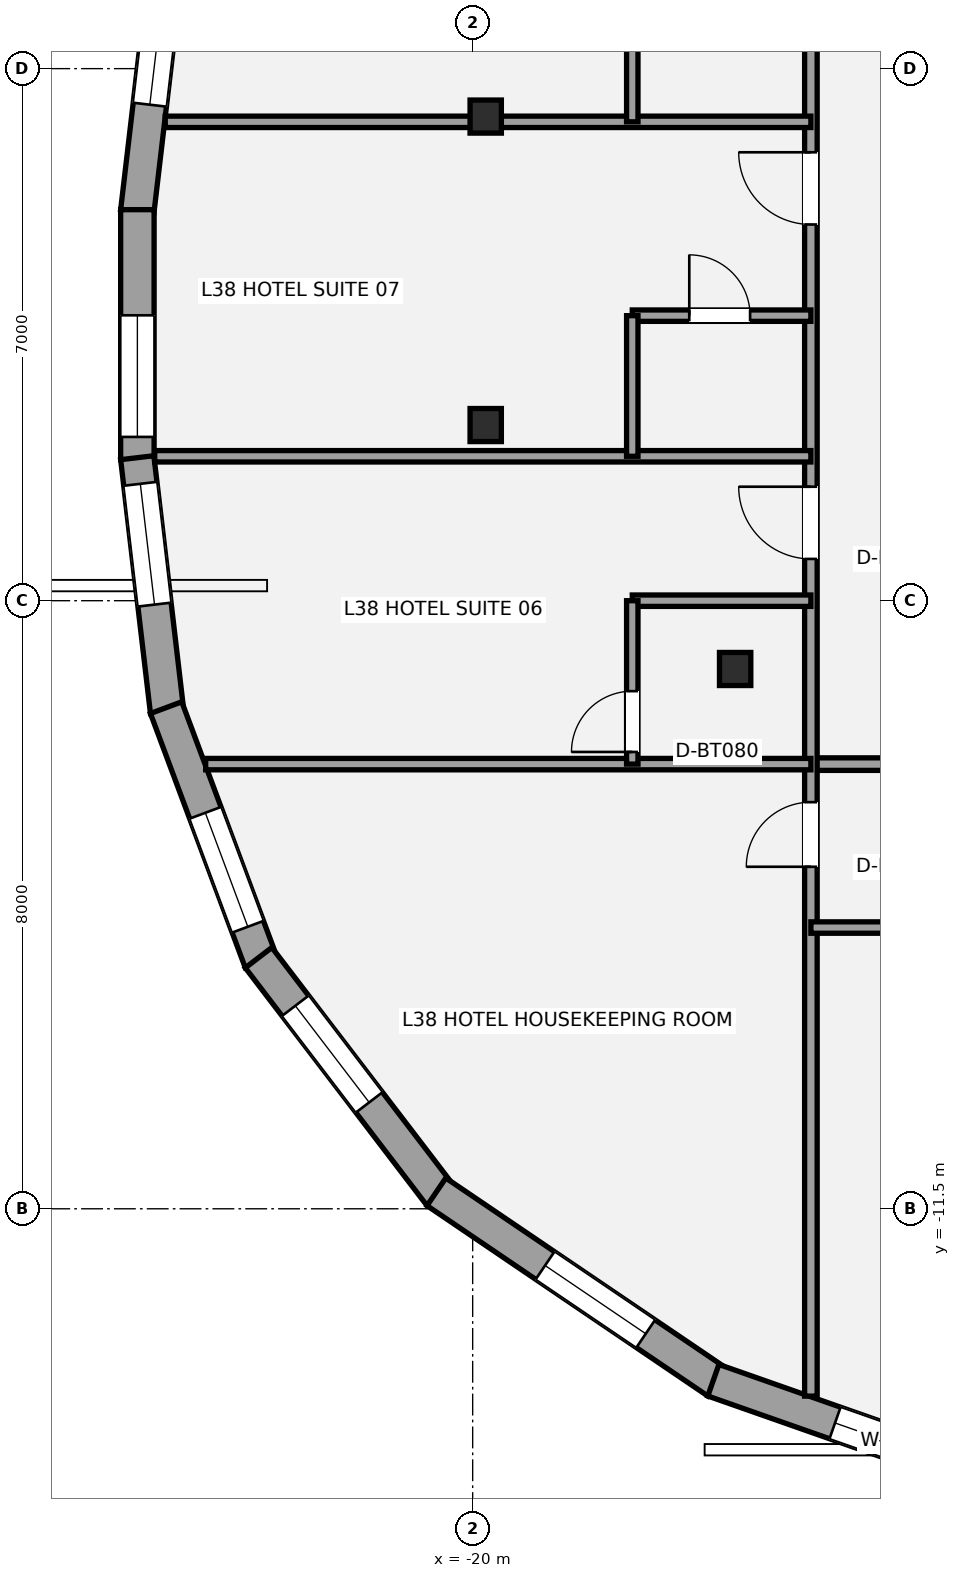
"""IFC4 building model, lengths in metres.
Left out: names, types, materials, properties, quantities, classifications, styles, units other than length and angle.
Written with IfcOpenShell. Run it as: python <this file> out.ifc"""

import sys

from ifc_helpers import new_model, si_unit, direction, frame, frame_2d, origin, origin_2d, place, context, subcontext, project, spatial, rectangle, i_section, extrude, element, fill, save


model = new_model("IFC4")
c1 = context("Model", 3, precision=1e-05, world=origin(), true_north=direction((0.0, 1.0)))
c2 = subcontext(c1, "Body", "Model", "MODEL_VIEW")
j1 = project(units=[si_unit("LENGTHUNIT", "METRE"), si_unit("PLANEANGLEUNIT", "RADIAN")], contexts=[c1])
p1 = place(None, origin())
s1 = spatial("IfcSite", under=j1, at=p1, CompositionType="ELEMENT")
p2 = place(p1, origin())
s2 = spatial("IfcBuilding", under=s1, at=p2, CompositionType="ELEMENT")
p3 = place(p2, frame((0.0, 0.0, 143.8)))
s3 = spatial("IfcBuildingStorey", under=s2, at=p3, CompositionType="ELEMENT", Elevation=143.8)
for number, where, z_axis, x_axis in (
    (1, (-19.828, 2.869, 0.0), (0.0, 0.0, 1.0), (1.0, 0.0, 0.0)),
    (2, (-19.828, -1.189, 0.0), (0.0, 0.0, 1.0), (1.0, 0.0, 0.0)),
    (3, (-16.547, -4.398, 0.0), (0.0, 0.0, 1.0), (1.0, 0.0, 0.0)),
):
    element("IfcColumn", number, at=place(p3, frame(where, z_axis=z_axis, x_axis=x_axis)), inside=s3, PredefinedType="COLUMN", context=c2, shape_type="SweptSolid", body=[
        extrude(i_section(OverallWidth=0.412, OverallDepth=0.435, WebThickness=0.036, FlangeThickness=0.057, at=origin_2d()), origin(), (0.0, 0.0, 1.0), 3.2),
    ])
p4 = place(p3, frame((-24.413, 1.619, 0.0), z_axis=(0.0, 0.0, 1.0), x_axis=(0.116605336518, 0.993178330158, 0.0)))
e4 = element("IfcWall", 4, at=p4, inside=s3, PredefinedType="STANDARD", context=c2, shape_type="SweptSolid", body=[
    extrude(rectangle(XDim=3.363, YDim=0.44, at=frame_2d((1.681, 0.0))), origin(), (0.0, 0.0, 1.0), 2.315),
])
p5 = place(p4, frame((1.417, 0.0, 0.58)))
e5 = element("IfcOpeningElement", 5, at=p5, cuts=e4, PredefinedType="OPENING", context=c2, shape_type="SweptSolid", body=[
    extrude(rectangle(XDim=1.6, YDim=1.55, at=frame_2d((0.8, 0.775))), frame((0.0, 0.23, 0.0), z_axis=(0.0, -1.0, 0.0), x_axis=(1.0, 0.0, 0.0)), (0.0, 0.0, 1.0), 0.46),
])
p6 = place(p3, frame((-24.412, -1.644, 0.0), z_axis=(0.0, 0.0, 1.0), x_axis=(0.0, 1.0, 0.0)))
e6 = element("IfcWall", 6, at=p6, inside=s3, PredefinedType="STANDARD", context=c2, shape_type="SweptSolid", body=[
    extrude(rectangle(XDim=3.289, YDim=0.44, at=frame_2d((1.644, 0.0))), origin(), (0.0, 0.0, 1.0), 2.315),
])
p7 = place(p6, frame((0.299, 0.0, 0.58)))
e7 = element("IfcOpeningElement", 7, at=p7, cuts=e6, PredefinedType="OPENING", context=c2, shape_type="SweptSolid", body=[
    extrude(rectangle(XDim=1.6, YDim=1.55, at=frame_2d((0.8, 0.775))), frame((0.0, 0.23, 0.0), z_axis=(0.0, -1.0, 0.0), x_axis=(1.0, 0.0, 0.0)), (0.0, 0.0, 1.0), 0.46),
])
p8 = place(p3, frame((-24.021, -4.958, 0.0), z_axis=(0.0, 0.0, 1.0), x_axis=(-0.116605336518, 0.993178330158, 0.0)))
e8 = element("IfcWall", 8, at=p8, inside=s3, PredefinedType="STANDARD", context=c2, shape_type="SweptSolid", body=[
    extrude(rectangle(XDim=3.363, YDim=0.44, at=frame_2d((1.681, 0.0))), origin(), (0.0, 0.0, 1.0), 2.315),
])
p9 = place(p8, frame((1.417, 0.0, 0.58)))
e9 = element("IfcOpeningElement", 9, at=p9, cuts=e8, PredefinedType="OPENING", context=c2, shape_type="SweptSolid", body=[
    extrude(rectangle(XDim=1.6, YDim=1.55, at=frame_2d((0.8, 0.775))), frame((0.0, 0.23, 0.0), z_axis=(0.0, -1.0, 0.0), x_axis=(1.0, 0.0, 0.0)), (0.0, 0.0, 1.0), 0.46),
])
p10 = place(p3, frame((-22.785, -8.253, 0.0), z_axis=(0.0, 0.0, 1.0), x_axis=(-0.349422124021, 0.936965409844, 0.0)))
e10 = element("IfcWall", 10, at=p10, inside=s3, PredefinedType="STANDARD", context=c2, shape_type="SweptSolid", body=[
    extrude(rectangle(XDim=3.571, YDim=0.44, at=frame_2d((1.786, 0.0))), origin(), (0.0, 0.0, 1.0), 2.315),
])
p11 = place(p10, frame((0.495, 0.0, 0.58)))
e11 = element("IfcOpeningElement", 11, at=p11, cuts=e10, PredefinedType="OPENING", context=c2, shape_type="SweptSolid", body=[
    extrude(rectangle(XDim=1.6, YDim=1.55, at=frame_2d((0.8, 0.775))), frame((0.0, 0.23, 0.0), z_axis=(0.0, -1.0, 0.0), x_axis=(1.0, 0.0, 0.0)), (0.0, 0.0, 1.0), 0.46),
])
p12 = place(p3, frame((-20.425, -11.326, 0.0), z_axis=(0.0, 0.0, 1.0), x_axis=(-0.607215400231, 0.794537260122, 0.0)))
e12 = element("IfcWall", 12, at=p12, inside=s3, PredefinedType="STANDARD", context=c2, shape_type="SweptSolid", body=[
    extrude(rectangle(XDim=3.939, YDim=0.44, at=frame_2d((1.969, 0.0))), origin(), (0.0, 0.0, 1.0), 2.315),
])
p13 = place(p12, frame((1.542, 0.0, 0.58)))
e13 = element("IfcOpeningElement", 13, at=p13, cuts=e12, PredefinedType="OPENING", context=c2, shape_type="SweptSolid", body=[
    extrude(rectangle(XDim=1.6, YDim=1.55, at=frame_2d((0.8, 0.775))), frame((0.0, 0.23, 0.0), z_axis=(0.0, -1.0, 0.0), x_axis=(1.0, 0.0, 0.0)), (0.0, 0.0, 1.0), 0.46),
])
p14 = place(p3, frame((-16.783, -13.781, 0.0), z_axis=(0.0, 0.0, 1.0), x_axis=(-0.827741657842, 0.561109390291, 0.0)))
e14 = element("IfcWall", 14, at=p14, inside=s3, PredefinedType="STANDARD", context=c2, shape_type="SweptSolid", body=[
    extrude(rectangle(XDim=4.463, YDim=0.44, at=frame_2d((2.231, 0.0))), origin(), (0.0, 0.0, 1.0), 2.315),
])
p15 = place(p14, frame((1.136, 0.0, 0.58)))
e15 = element("IfcOpeningElement", 15, at=p15, cuts=e14, PredefinedType="OPENING", context=c2, shape_type="SweptSolid", body=[
    extrude(rectangle(XDim=1.6, YDim=1.55, at=frame_2d((0.8, 0.775))), frame((0.0, 0.23, 0.0), z_axis=(0.0, -1.0, 0.0), x_axis=(1.0, 0.0, 0.0)), (0.0, 0.0, 1.0), 0.46),
])
p16 = place(p3, frame((-12.216, -15.377, 0.0), z_axis=(0.0, 0.0, 1.0), x_axis=(-0.943528860281, 0.331290340662, 0.0)))
e16 = element("IfcWall", 16, at=p16, inside=s3, PredefinedType="STANDARD", context=c2, shape_type="SweptSolid", body=[
    extrude(rectangle(XDim=4.893, YDim=0.44, at=frame_2d((2.447, 0.0))), origin(), (0.0, 0.0, 1.0), 2.315),
])
p17 = place(p16, frame((1.796, 0.0, 0.58)))
e17 = element("IfcOpeningElement", 17, at=p17, cuts=e16, PredefinedType="OPENING", context=c2, shape_type="SweptSolid", body=[
    extrude(rectangle(XDim=1.4, YDim=1.55, at=frame_2d((0.7, 0.775))), frame((0.0, 0.23, 0.0), z_axis=(0.0, -1.0, 0.0), x_axis=(1.0, 0.0, 0.0)), (0.0, 0.0, 1.0), 0.46),
])
p18 = place(p3, frame((-15.55, -5.65, 0.0), z_axis=(0.0, 0.0, 1.0), x_axis=(1.0, 0.0, 0.0)))
e18 = element("IfcWall", 18, at=p18, inside=s3, PredefinedType="PARTITIONING", context=c2, shape_type="SweptSolid", body=[
    extrude(rectangle(XDim=31.1, YDim=0.165, at=frame_2d((15.55, 0.0))), origin(), (0.0, 0.0, 1.0), 2.398),
])
p19 = place(p18, frame((4.6, 0.0, 0.0)))
e19 = element("IfcOpeningElement", 19, at=p19, cuts=e18, PredefinedType="OPENING", context=c2, shape_type="SweptSolid", body=[
    extrude(rectangle(XDim=0.95, YDim=2.15, at=frame_2d((0.475, 1.075))), frame((0.0, 0.093, 0.0), z_axis=(0.0, -1.0, 0.0), x_axis=(1.0, 0.0, 0.0)), (0.0, 0.0, 1.0), 0.185),
])
p20 = place(p18, frame((11.0, 0.0, 0.0)))
e20 = element("IfcOpeningElement", 20, at=p20, cuts=e18, PredefinedType="OPENING", context=c2, shape_type="SweptSolid", body=[
    extrude(rectangle(XDim=0.95, YDim=2.15, at=frame_2d((0.475, 1.075))), frame((0.0, 0.093, 0.0), z_axis=(0.0, -1.0, 0.0), x_axis=(1.0, 0.0, 0.0)), (0.0, 0.0, 1.0), 0.185),
])
p21 = place(p18, frame((17.4, 0.0, 0.0)))
e21 = element("IfcOpeningElement", 21, at=p21, cuts=e18, PredefinedType="OPENING", context=c2, shape_type="SweptSolid", body=[
    extrude(rectangle(XDim=0.95, YDim=2.15, at=frame_2d((0.475, 1.075))), frame((0.0, 0.093, 0.0), z_axis=(0.0, -1.0, 0.0), x_axis=(1.0, 0.0, 0.0)), (0.0, 0.0, 1.0), 0.185),
])
p22 = place(p18, frame((23.8, 0.0, 0.0)))
e22 = element("IfcOpeningElement", 22, at=p22, cuts=e18, PredefinedType="OPENING", context=c2, shape_type="SweptSolid", body=[
    extrude(rectangle(XDim=0.95, YDim=2.15, at=frame_2d((0.475, 1.075))), frame((0.0, 0.093, 0.0), z_axis=(0.0, -1.0, 0.0), x_axis=(1.0, 0.0, 0.0)), (0.0, 0.0, 1.0), 0.185),
])
p23 = place(p18, frame((29.75, 0.0, 0.0)))
e23 = element("IfcOpeningElement", 23, at=p23, cuts=e18, PredefinedType="OPENING", context=c2, shape_type="SweptSolid", body=[
    extrude(rectangle(XDim=0.95, YDim=2.15, at=frame_2d((0.475, 1.075))), frame((0.0, 0.093, 0.0), z_axis=(0.0, -1.0, 0.0), x_axis=(1.0, 0.0, 0.0)), (0.0, 0.0, 1.0), 0.185),
])
p24 = place(p3, frame((-15.55, -13.965, 0.0), z_axis=(0.0, 0.0, 1.0), x_axis=(0.0, 1.0, 0.0)))
e24 = element("IfcWall", 24, at=p24, inside=s3, PredefinedType="PARTITIONING", context=c2, shape_type="SweptSolid", body=[
    extrude(rectangle(XDim=21.515, YDim=0.165, at=frame_2d((10.757, 0.0))), origin(), (0.0, 0.0, 1.0), 2.473),
])
p25 = place(p24, frame((6.964, 0.0, 0.0)))
e25 = element("IfcOpeningElement", 25, at=p25, cuts=e24, PredefinedType="OPENING", context=c2, shape_type="SweptSolid", body=[
    extrude(rectangle(XDim=0.85, YDim=2.1, at=frame_2d((0.425, 1.05))), frame((0.0, 0.093, 0.0), z_axis=(0.0, -1.0, 0.0), x_axis=(1.0, 0.0, 0.0)), (0.0, 0.0, 1.0), 0.185),
])
p26 = place(p24, frame((11.014, 0.0, 0.0)))
e26 = element("IfcOpeningElement", 26, at=p26, cuts=e24, PredefinedType="OPENING", context=c2, shape_type="SweptSolid", body=[
    extrude(rectangle(XDim=0.95, YDim=2.15, at=frame_2d((0.475, 1.075))), frame((0.0, 0.093, 0.0), z_axis=(0.0, -1.0, 0.0), x_axis=(1.0, 0.0, 0.0)), (0.0, 0.0, 1.0), 0.185),
])
p27 = place(p24, frame((15.414, 0.0, 0.0)))
e27 = element("IfcOpeningElement", 27, at=p27, cuts=e24, PredefinedType="OPENING", context=c2, shape_type="SweptSolid", body=[
    extrude(rectangle(XDim=0.95, YDim=2.15, at=frame_2d((0.475, 1.075))), frame((0.0, 0.093, 0.0), z_axis=(0.0, -1.0, 0.0), x_axis=(1.0, 0.0, 0.0)), (0.0, 0.0, 1.0), 0.185),
])
p28 = place(p24, frame((20.165, 0.0, 0.0)))
e28 = element("IfcOpeningElement", 28, at=p28, cuts=e24, PredefinedType="OPENING", context=c2, shape_type="SweptSolid", body=[
    extrude(rectangle(XDim=0.95, YDim=2.15, at=frame_2d((0.475, 1.075))), frame((0.0, 0.093, 0.0), z_axis=(0.0, -1.0, 0.0), x_axis=(1.0, 0.0, 0.0)), (0.0, 0.0, 1.0), 0.185),
])
p29 = place(p3, frame((-23.513, -5.65, 0.0), z_axis=(0.0, 0.0, 1.0), x_axis=(1.0, 0.0, 0.0)))
e29 = element("IfcWall", 29, at=p29, inside=s3, PredefinedType="PLUMBINGWALL", context=c2, shape_type="SweptSolid", body=[
    extrude(rectangle(XDim=7.963, YDim=0.15, at=frame_2d((3.981, 0.0))), origin(), (0.0, 0.0, 1.0), 2.473),
])
p30 = place(p3, frame((-15.55, -7.8, 0.0), z_axis=(0.0, 0.0, 1.0), x_axis=(1.0, 0.0, 0.0)))
e30 = element("IfcWall", 30, at=p30, inside=s3, PredefinedType="PLUMBINGWALL", context=c2, shape_type="SweptSolid", body=[
    extrude(rectangle(XDim=1.85, YDim=0.15, at=frame_2d((0.925, 0.0))), origin(), (0.0, 0.0, 1.0), 3.02),
])
p31 = place(p3, frame((-24.184, -1.6, 0.0), z_axis=(0.0, 0.0, 1.0), x_axis=(1.0, 0.0, 0.0)))
e31 = element("IfcWall", 31, at=p31, inside=s3, PredefinedType="PLUMBINGWALL", context=c2, shape_type="SweptSolid", body=[
    extrude(rectangle(XDim=8.634, YDim=0.15, at=frame_2d((4.317, 0.0))), origin(), (0.0, 0.0, 1.0), 2.398),
])
p32 = place(p3, frame((-24.045, 2.8, 0.0), z_axis=(0.0, 0.0, 1.0), x_axis=(1.0, 0.0, 0.0)))
e32 = element("IfcWall", 32, at=p32, inside=s3, PredefinedType="PLUMBINGWALL", context=c2, shape_type="SweptSolid", body=[
    extrude(rectangle(XDim=8.495, YDim=0.15, at=frame_2d((4.247, 0.0))), origin(), (0.0, 0.0, 1.0), 2.473),
])
p33 = place(p3, frame((-17.9, -3.5, 0.0), z_axis=(0.0, 0.0, 1.0), x_axis=(1.0, 0.0, 0.0)))
e33 = element("IfcWall", 33, at=p33, inside=s3, PredefinedType="PLUMBINGWALL", context=c2, shape_type="SweptSolid", body=[
    extrude(rectangle(XDim=2.35, YDim=0.15, at=frame_2d((1.175, 0.0))), origin(), (0.0, 0.0, 1.0), 2.398),
])
p34 = place(p3, frame((-17.9, -5.65, 0.0), z_axis=(0.0, 0.0, 1.0), x_axis=(0.0, 1.0, 0.0)))
e34 = element("IfcWall", 34, at=p34, inside=s3, PredefinedType="PLUMBINGWALL", context=c2, shape_type="SweptSolid", body=[
    extrude(rectangle(XDim=2.15, YDim=0.15, at=frame_2d((1.075, 0.0))), origin(), (0.0, 0.0, 1.0), 2.473),
])
p35 = place(p34, frame((0.16, 0.0, 0.0)))
e35 = element("IfcOpeningElement", 35, at=p35, cuts=e34, PredefinedType="OPENING", context=c2, shape_type="SweptSolid", body=[
    extrude(rectangle(XDim=0.8, YDim=2.1, at=frame_2d((0.4, 1.05))), frame((0.0, 0.085, 0.0), z_axis=(0.0, -1.0, 0.0), x_axis=(1.0, 0.0, 0.0)), (0.0, 0.0, 1.0), 0.17),
])
p36 = place(p3, frame((-17.9, 0.25, 0.0), z_axis=(0.0, 0.0, 1.0), x_axis=(1.0, 0.0, 0.0)))
e36 = element("IfcWall", 36, at=p36, inside=s3, PredefinedType="PLUMBINGWALL", context=c2, shape_type="SweptSolid", body=[
    extrude(rectangle(XDim=2.35, YDim=0.15, at=frame_2d((1.175, 0.0))), origin(), (0.0, 0.0, 1.0), 2.473),
])
p37 = place(p36, frame((0.75, 0.0, 0.0)))
e37 = element("IfcOpeningElement", 37, at=p37, cuts=e36, PredefinedType="OPENING", context=c2, shape_type="SweptSolid", body=[
    extrude(rectangle(XDim=0.8, YDim=2.1, at=frame_2d((0.4, 1.05))), frame((0.0, 0.085, 0.0), z_axis=(0.0, -1.0, 0.0), x_axis=(1.0, 0.0, 0.0)), (0.0, 0.0, 1.0), 0.17),
])
p38 = place(p3, frame((-17.9, -1.6, 0.0), z_axis=(0.0, 0.0, 1.0), x_axis=(0.0, 1.0, 0.0)))
e38 = element("IfcWall", 38, at=p38, inside=s3, PredefinedType="PLUMBINGWALL", context=c2, shape_type="SweptSolid", body=[
    extrude(rectangle(XDim=1.85, YDim=0.15, at=frame_2d((0.925, 0.0))), origin(), (0.0, 0.0, 1.0), 3.02),
])
p39 = place(p3, frame((-17.9, 2.8, 0.0), z_axis=(0.0, 0.0, 1.0), x_axis=(0.0, 1.0, 0.0)))
e39 = element("IfcWall", 39, at=p39, inside=s3, PredefinedType="PLUMBINGWALL", context=c2, shape_type="SweptSolid", body=[
    extrude(rectangle(XDim=1.85, YDim=0.15, at=frame_2d((0.925, 0.0))), origin(), (0.0, 0.0, 1.0), 3.02),
])
p40 = place(p5, origin())
e40 = element("IfcWindow", 40, at=p40, inside=s3, PartitioningType="SINGLE_PANEL", PredefinedType="WINDOW", context=c2, shape_type="SweptSolid", body=[
    extrude(rectangle(XDim=1.6, YDim=1.55, at=frame_2d((0.8, 0.775))), frame((0.0, -0.01, 0.0), z_axis=(0.0, -1.0, 0.0), x_axis=(1.0, 0.0, 0.0)), (0.0, 0.0, 1.0), 0.06),
])
fill(e5, e40)
p41 = place(p7, origin())
e41 = element("IfcWindow", 41, at=p41, inside=s3, PartitioningType="SINGLE_PANEL", PredefinedType="WINDOW", context=c2, shape_type="SweptSolid", body=[
    extrude(rectangle(XDim=1.6, YDim=1.55, at=frame_2d((0.8, 0.775))), frame((0.0, -0.01, 0.0), z_axis=(0.0, -1.0, 0.0), x_axis=(1.0, 0.0, 0.0)), (0.0, 0.0, 1.0), 0.06),
])
fill(e7, e41)
p42 = place(p9, origin())
e42 = element("IfcWindow", 42, at=p42, inside=s3, PartitioningType="SINGLE_PANEL", PredefinedType="WINDOW", context=c2, shape_type="SweptSolid", body=[
    extrude(rectangle(XDim=1.6, YDim=1.55, at=frame_2d((0.8, 0.775))), frame((0.0, -0.01, 0.0), z_axis=(0.0, -1.0, 0.0), x_axis=(1.0, 0.0, 0.0)), (0.0, 0.0, 1.0), 0.06),
])
fill(e9, e42)
p43 = place(p11, origin())
e43 = element("IfcWindow", 43, at=p43, inside=s3, PartitioningType="SINGLE_PANEL", PredefinedType="WINDOW", context=c2, shape_type="SweptSolid", body=[
    extrude(rectangle(XDim=1.6, YDim=1.55, at=frame_2d((0.8, 0.775))), frame((0.0, -0.01, 0.0), z_axis=(0.0, -1.0, 0.0), x_axis=(1.0, 0.0, 0.0)), (0.0, 0.0, 1.0), 0.06),
])
fill(e11, e43)
p44 = place(p13, origin())
e44 = element("IfcWindow", 44, at=p44, inside=s3, PartitioningType="SINGLE_PANEL", PredefinedType="WINDOW", context=c2, shape_type="SweptSolid", body=[
    extrude(rectangle(XDim=1.6, YDim=1.55, at=frame_2d((0.8, 0.775))), frame((0.0, -0.01, 0.0), z_axis=(0.0, -1.0, 0.0), x_axis=(1.0, 0.0, 0.0)), (0.0, 0.0, 1.0), 0.06),
])
fill(e13, e44)
p45 = place(p15, origin())
e45 = element("IfcWindow", 45, at=p45, inside=s3, PartitioningType="SINGLE_PANEL", PredefinedType="WINDOW", context=c2, shape_type="SweptSolid", body=[
    extrude(rectangle(XDim=1.6, YDim=1.55, at=frame_2d((0.8, 0.775))), frame((0.0, -0.01, 0.0), z_axis=(0.0, -1.0, 0.0), x_axis=(1.0, 0.0, 0.0)), (0.0, 0.0, 1.0), 0.06),
])
fill(e15, e45)
p46 = place(p17, origin())
e46 = element("IfcWindow", 46, at=p46, inside=s3, PartitioningType="SINGLE_PANEL", PredefinedType="WINDOW", context=c2, shape_type="SweptSolid", body=[
    extrude(rectangle(XDim=1.4, YDim=1.55, at=frame_2d((0.7, 0.775))), frame((0.0, -0.01, 0.0), z_axis=(0.0, -1.0, 0.0), x_axis=(1.0, 0.0, 0.0)), (0.0, 0.0, 1.0), 0.06),
])
fill(e17, e46)
p47 = place(p25, origin())
e47 = element("IfcDoor", 47, at=p47, inside=s3, OperationType="SINGLE_SWING_LEFT", PredefinedType="DOOR", context=c2, shape_type="SweptSolid", body=[
    extrude(rectangle(XDim=0.85, YDim=2.1, at=frame_2d((0.425, 1.05))), frame((0.0, 0.025, 0.0), z_axis=(0.0, -1.0, 0.0), x_axis=(1.0, 0.0, 0.0)), (0.0, 0.0, 1.0), 0.05),
])
fill(e25, e47)
p48 = place(p26, origin())
e48 = element("IfcDoor", 48, at=p48, inside=s3, OperationType="SINGLE_SWING_RIGHT", PredefinedType="DOOR", context=c2, shape_type="SweptSolid", body=[
    extrude(rectangle(XDim=0.95, YDim=2.15, at=frame_2d((0.475, 1.075))), frame((0.0, 0.025, 0.0), z_axis=(0.0, -1.0, 0.0), x_axis=(1.0, 0.0, 0.0)), (0.0, 0.0, 1.0), 0.05),
])
fill(e26, e48)
p49 = place(p35, origin())
e49 = element("IfcDoor", 49, at=p49, inside=s3, OperationType="SINGLE_SWING_LEFT", PredefinedType="DOOR", context=c2, shape_type="SweptSolid", body=[
    extrude(rectangle(XDim=0.8, YDim=2.1, at=frame_2d((0.4, 1.05))), frame((0.0, 0.025, 0.0), z_axis=(0.0, -1.0, 0.0), x_axis=(1.0, 0.0, 0.0)), (0.0, 0.0, 1.0), 0.05),
])
fill(e35, e49)
p50 = place(p27, origin())
e50 = element("IfcDoor", 50, at=p50, inside=s3, OperationType="SINGLE_SWING_RIGHT", PredefinedType="DOOR", context=c2, shape_type="SweptSolid", body=[
    extrude(rectangle(XDim=0.95, YDim=2.15, at=frame_2d((0.475, 1.075))), frame((0.0, 0.025, 0.0), z_axis=(0.0, -1.0, 0.0), x_axis=(1.0, 0.0, 0.0)), (0.0, 0.0, 1.0), 0.05),
])
fill(e27, e50)
p51 = place(p37, origin())
e51 = element("IfcDoor", 51, at=p51, inside=s3, OperationType="SINGLE_SWING_LEFT", PredefinedType="DOOR", context=c2, shape_type="SweptSolid", body=[
    extrude(rectangle(XDim=0.8, YDim=2.1, at=frame_2d((0.4, 1.05))), frame((0.0, 0.025, 0.0), z_axis=(0.0, -1.0, 0.0), x_axis=(1.0, 0.0, 0.0)), (0.0, 0.0, 1.0), 0.05),
])
fill(e37, e51)
save(model, sys.argv[1])
